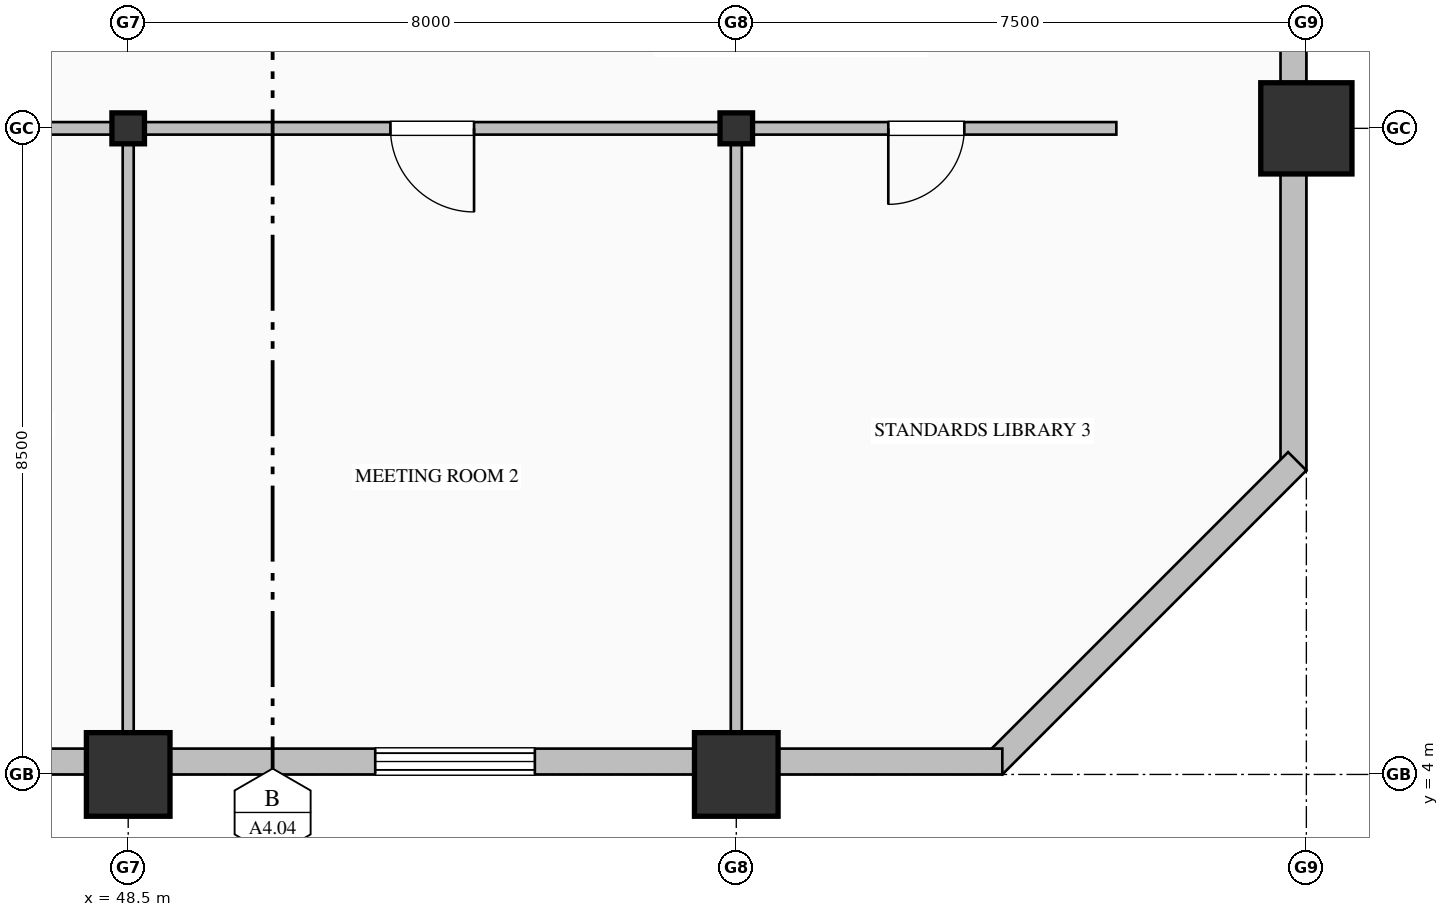
"""IFC4 building model, lengths in metres.
Left out: names, types, materials, properties, quantities, classifications, styles, units other than length and angle.
Written with IfcOpenShell. Run it as: python <this file> out.ifc"""

import sys

from ifc_helpers import new_model, si_unit, direction, frame, frame_2d, origin, origin_2d, place, context, subcontext, project, spatial, rectangle, hollow_rectangle, hollow_circle, i_section, extrude, element, fill, save


model = new_model("IFC4")
c1 = context("Model", 3, precision=1e-05, world=origin(), true_north=direction((0.0, 1.0)))
c2 = subcontext(c1, "Body", "Model", "MODEL_VIEW")
j1 = project(units=[si_unit("LENGTHUNIT", "METRE"), si_unit("PLANEANGLEUNIT", "RADIAN")], contexts=[c1])
p1 = place(None, origin())
s1 = spatial("IfcSite", under=j1, at=p1, CompositionType="ELEMENT")
p2 = place(p1, origin())
s2 = spatial("IfcBuilding", under=s1, at=p2, CompositionType="ELEMENT")
p3 = place(p2, frame((0.0, 0.0, 44.2)))
s3 = spatial("IfcBuildingStorey", under=s2, at=p3, CompositionType="ELEMENT", Elevation=44.2)
p4 = place(p3, frame((48.5, 4.0, 0.0), z_axis=(0.0, 0.0, 1.0), x_axis=(1.0, 0.0, 0.0)))
e1 = element("IfcColumn", 1, at=p4, inside=s3, PredefinedType="COLUMN", context=c2, shape_type="SweptSolid", body=[
    extrude(hollow_rectangle(XDim=1.1, YDim=1.1, WallThickness=0.04, at=origin_2d()), origin(), (0.0, 0.0, 1.0), 4.0),
])
p5 = place(p3, frame((48.5, 12.5, 0.0), z_axis=(0.0, 0.0, 1.0), x_axis=(1.0, 0.0, 0.0)))
e2 = element("IfcColumn", 2, at=p5, inside=s3, PredefinedType="COLUMN", context=c2, shape_type="SweptSolid", body=[
    extrude(i_section(OverallWidth=0.407, OverallDepth=0.428, WebThickness=0.02, FlangeThickness=0.035, FilletRadius=0.022, at=origin_2d()), origin(), (0.0, 0.0, 1.0), 4.0),
])
p6 = place(p3, frame((56.5, 4.0, 0.0), z_axis=(0.0, 0.0, 1.0), x_axis=(1.0, 0.0, 0.0)))
e3 = element("IfcColumn", 3, at=p6, inside=s3, PredefinedType="COLUMN", context=c2, shape_type="SweptSolid", body=[
    extrude(hollow_rectangle(XDim=1.1, YDim=1.1, WallThickness=0.04, at=origin_2d()), origin(), (0.0, 0.0, 1.0), 4.0),
])
p7 = place(p3, frame((56.5, 12.5, 0.0), z_axis=(0.0, 0.0, 1.0), x_axis=(1.0, 0.0, 0.0)))
e4 = element("IfcColumn", 4, at=p7, inside=s3, PredefinedType="COLUMN", context=c2, shape_type="SweptSolid", body=[
    extrude(i_section(OverallWidth=0.407, OverallDepth=0.428, WebThickness=0.02, FlangeThickness=0.035, FilletRadius=0.022, at=origin_2d()), origin(), (0.0, 0.0, 1.0), 4.0),
])
p8 = place(p3, frame((64.0, 12.5, 0.0), z_axis=(0.0, 0.0, 1.0), x_axis=(1.0, 0.0, 0.0)))
e5 = element("IfcColumn", 5, at=p8, inside=s3, PredefinedType="COLUMN", context=c2, shape_type="SweptSolid", body=[
    extrude(hollow_circle(Radius=0.6, WallThickness=0.04, at=origin_2d()), origin(), (0.0, 0.0, 1.0), 4.0),
])
p9 = place(p3, frame((63.83, 36.05, 0.0), z_axis=(0.0, 0.0, 1.0), x_axis=(0.0, -1.0, 0.0)))
e6 = element("IfcWall", 6, at=p9, inside=s3, PredefinedType="SOLIDWALL", context=c2, shape_type="SweptSolid", body=[
    extrude(rectangle(XDim=28.05, YDim=0.34, at=frame_2d((14.025, 0.0))), origin(), (0.0, 0.0, 1.0), 3.25),
])
p10 = place(p9, frame((2.55, 0.0, 0.85)))
e7 = element("IfcOpeningElement", 7, at=p10, cuts=e6, PredefinedType="OPENING", context=c2, shape_type="SweptSolid", body=[
    extrude(rectangle(XDim=2.1, YDim=2.05, at=frame_2d((1.05, 1.025))), frame((0.0, 0.18, 0.0), z_axis=(0.0, -1.0, 0.0), x_axis=(1.0, 0.0, 0.0)), (0.0, 0.0, 1.0), 0.36),
])
p11 = place(p9, frame((9.9, 0.0, 0.85)))
e8 = element("IfcOpeningElement", 8, at=p11, cuts=e6, PredefinedType="OPENING", context=c2, shape_type="SweptSolid", body=[
    extrude(rectangle(XDim=1.8, YDim=2.05, at=frame_2d((0.9, 1.025))), frame((0.0, 0.18, 0.0), z_axis=(0.0, -1.0, 0.0), x_axis=(1.0, 0.0, 0.0)), (0.0, 0.0, 1.0), 0.36),
])
p12 = place(p9, frame((13.35, 0.0, 0.85)))
e9 = element("IfcOpeningElement", 9, at=p12, cuts=e6, PredefinedType="OPENING", context=c2, shape_type="SweptSolid", body=[
    extrude(rectangle(XDim=2.1, YDim=2.05, at=frame_2d((1.05, 1.025))), frame((0.0, 0.18, 0.0), z_axis=(0.0, -1.0, 0.0), x_axis=(1.0, 0.0, 0.0)), (0.0, 0.0, 1.0), 0.36),
])
p13 = place(p3, frame((63.88, 8.12, 0.0), z_axis=(0.0, 0.0, 1.0), x_axis=(-0.707106781187, -0.707106781187, 0.0)))
e10 = element("IfcWall", 10, at=p13, inside=s3, PredefinedType="SOLIDWALL", context=c2, shape_type="SweptSolid", body=[
    extrude(rectangle(XDim=5.657, YDim=0.34, at=frame_2d((2.828, 0.0))), origin(), (0.0, 0.0, 1.0), 3.75),
])
p14 = place(p3, frame((60.0, 4.17, 0.0), z_axis=(0.0, 0.0, 1.0), x_axis=(-1.0, 0.0, 0.0)))
e11 = element("IfcWall", 11, at=p14, inside=s3, PredefinedType="SOLIDWALL", context=c2, shape_type="SweptSolid", body=[
    extrude(rectangle(XDim=15.5, YDim=0.34, at=frame_2d((7.75, 0.0))), origin(), (0.0, 0.0, 1.0), 3.25),
])
p15 = place(p14, frame((6.15, 0.0, 0.85)))
e12 = element("IfcOpeningElement", 12, at=p15, cuts=e11, PredefinedType="OPENING", context=c2, shape_type="SweptSolid", body=[
    extrude(rectangle(XDim=2.1, YDim=2.05, at=frame_2d((1.05, 1.025))), frame((0.0, 0.18, 0.0), z_axis=(0.0, -1.0, 0.0), x_axis=(1.0, 0.0, 0.0)), (0.0, 0.0, 1.0), 0.36),
])
p16 = place(p3, frame((48.5, 12.5, 0.0), z_axis=(0.0, 0.0, 1.0), x_axis=(-1.0, 0.0, 0.0)))
e13 = element("IfcWall", 13, at=p16, inside=s3, PredefinedType="PARTITIONING", context=c2, shape_type="SweptSolid", body=[
    extrude(rectangle(XDim=3.3, YDim=0.165, at=frame_2d((1.65, 0.0))), origin(), (0.0, 0.0, 1.0), 3.042),
])
p17 = place(p16, frame((1.1, 0.0, 0.0)))
e14 = element("IfcOpeningElement", 14, at=p17, cuts=e13, PredefinedType="OPENING", context=c2, shape_type="SweptSolid", body=[
    extrude(rectangle(XDim=1.1, YDim=2.2, at=frame_2d((0.55, 1.1))), frame((0.0, 0.093, 0.0), z_axis=(0.0, -1.0, 0.0), x_axis=(1.0, 0.0, 0.0)), (0.0, 0.0, 1.0), 0.185),
])
p18 = place(p3, frame((56.5, 12.5, 0.0), z_axis=(0.0, 0.0, 1.0), x_axis=(-1.0, 0.0, 0.0)))
e15 = element("IfcWall", 15, at=p18, inside=s3, PredefinedType="PARTITIONING", context=c2, shape_type="SweptSolid", body=[
    extrude(rectangle(XDim=8.0, YDim=0.165, at=frame_2d((4.0, 0.0))), origin(), (0.0, 0.0, 1.0), 3.042),
])
p19 = place(p18, frame((3.45, 0.0, 0.0)))
e16 = element("IfcOpeningElement", 16, at=p19, cuts=e15, PredefinedType="OPENING", context=c2, shape_type="SweptSolid", body=[
    extrude(rectangle(XDim=1.1, YDim=2.2, at=frame_2d((0.55, 1.1))), frame((0.0, 0.093, 0.0), z_axis=(0.0, -1.0, 0.0), x_axis=(1.0, 0.0, 0.0)), (0.0, 0.0, 1.0), 0.185),
])
p20 = place(p3, frame((61.5, 12.5, 0.0), z_axis=(0.0, 0.0, 1.0), x_axis=(-1.0, 0.0, 0.0)))
e17 = element("IfcWall", 17, at=p20, inside=s3, PredefinedType="PARTITIONING", context=c2, shape_type="SweptSolid", body=[
    extrude(rectangle(XDim=5.0, YDim=0.165, at=frame_2d((2.5, 0.0))), origin(), (0.0, 0.0, 1.0), 3.042),
])
p21 = place(p20, frame((2.0, 0.0, 0.0)))
e18 = element("IfcOpeningElement", 18, at=p21, cuts=e17, PredefinedType="OPENING", context=c2, shape_type="SweptSolid", body=[
    extrude(rectangle(XDim=1.0, YDim=2.15, at=frame_2d((0.5, 1.075))), frame((0.0, 0.093, 0.0), z_axis=(0.0, -1.0, 0.0), x_axis=(1.0, 0.0, 0.0)), (0.0, 0.0, 1.0), 0.185),
])
for number, where, z_axis, x_axis in (
    (19, (48.5, 12.426, 0.0), (0.0, 0.0, 1.0), (0.0, -1.0, 0.0)),
    (20, (56.5, 12.426, 0.0), (0.0, 0.0, 1.0), (0.0, -1.0, 0.0)),
):
    element("IfcWall", number, at=place(p3, frame(where, z_axis=z_axis, x_axis=x_axis)), inside=s3, PredefinedType="PARTITIONING", context=c2, shape_type="SweptSolid", body=[
        extrude(rectangle(XDim=8.094, YDim=0.145, at=frame_2d((4.047, 0.0))), origin(), (0.0, 0.0, 1.0), 3.042),
    ])
p22 = place(p15, origin())
e21 = element("IfcWindow", 21, at=p22, inside=s3, PartitioningType="TRIPLE_PANEL_VERTICAL", PredefinedType="WINDOW", context=c2, shape_type="SweptSolid", body=[
    extrude(rectangle(XDim=2.1, YDim=2.05, at=frame_2d((1.05, 1.025))), frame((0.0, 0.15, 0.0), z_axis=(0.0, -1.0, 0.0), x_axis=(1.0, 0.0, 0.0)), (0.0, 0.0, 1.0), 0.06),
])
fill(e12, e21)
p23 = place(p19, origin())
e22 = element("IfcDoor", 22, at=p23, inside=s3, OperationType="SINGLE_SWING_LEFT", PredefinedType="DOOR", context=c2, shape_type="SweptSolid", body=[
    extrude(rectangle(XDim=1.1, YDim=2.2, at=frame_2d((0.55, 1.1))), frame((0.0, 0.025, 0.0), z_axis=(0.0, -1.0, 0.0), x_axis=(1.0, 0.0, 0.0)), (0.0, 0.0, 1.0), 0.05),
])
fill(e16, e22)
p24 = place(p21, origin())
e23 = element("IfcDoor", 23, at=p24, inside=s3, OperationType="SINGLE_SWING_RIGHT", PredefinedType="DOOR", context=c2, shape_type="SweptSolid", body=[
    extrude(rectangle(XDim=1.0, YDim=2.15, at=frame_2d((0.5, 1.075))), frame((0.0, 0.025, 0.0), z_axis=(0.0, -1.0, 0.0), x_axis=(1.0, 0.0, 0.0)), (0.0, 0.0, 1.0), 0.05),
])
fill(e18, e23)
save(model, sys.argv[1])
